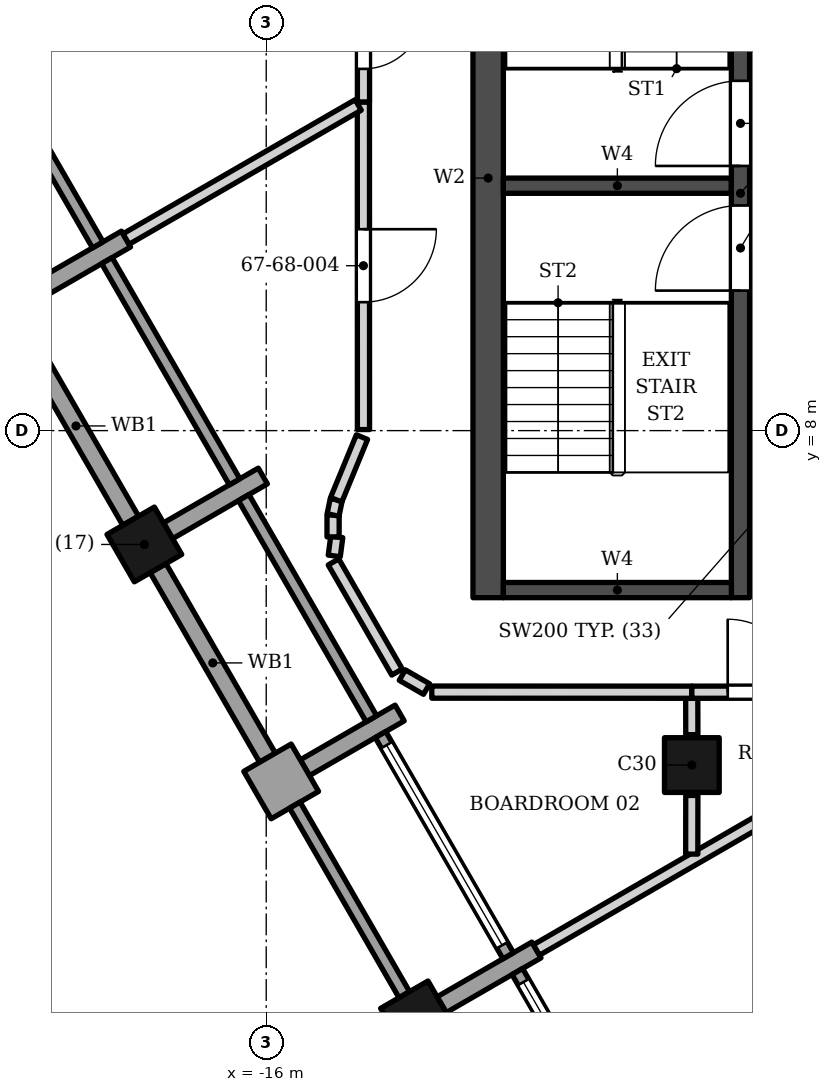
"""IFC4 building model, lengths in metres.
Left out: names, types, materials, properties, quantities, classifications, styles, units other than length and angle.
Written with IfcOpenShell. Run it as: python <this file> out.ifc"""

import sys

from ifc_helpers import new_model, si_unit, direction, frame, frame_2d, origin, origin_2d, place, context, subcontext, project, spatial, rectangle, extrude, element, fill, save


model = new_model("IFC4")
c1 = context("Model", 3, precision=1e-05, world=origin(), true_north=direction((0.0, 1.0)))
c2 = subcontext(c1, "Body", "Model", "MODEL_VIEW")
j1 = project(units=[si_unit("LENGTHUNIT", "METRE"), si_unit("PLANEANGLEUNIT", "RADIAN")], contexts=[c1])
p1 = place(None, origin())
s1 = spatial("IfcSite", under=j1, at=p1, CompositionType="ELEMENT")
p2 = place(p1, origin())
s2 = spatial("IfcBuilding", under=s1, at=p2, CompositionType="ELEMENT")
p3 = place(p2, frame((0.0, 0.0, 279.4)))
s3 = spatial("IfcBuildingStorey", under=s2, at=p3, CompositionType="ELEMENT", Elevation=279.4)
p4 = place(p3, frame((-12.35, 5.253, 0.0), z_axis=(0.0, 0.0, 1.0), x_axis=(0.0, 1.0, 0.0)))
e1 = element("IfcWall", 1, at=p4, inside=s3, PredefinedType="SHEAR", context=c2, shape_type="SweptSolid", body=[
    extrude(rectangle(XDim=13.8, YDim=0.5, at=frame_2d((6.9, 0.0))), origin(), (0.0, 0.0, 1.0), 3.9),
])
p5 = place(p3, frame((-8.2, 5.253, 0.0), z_axis=(0.0, 0.0, 1.0), x_axis=(0.0, 1.0, 0.0)))
e2 = element("IfcWall", 2, at=p5, inside=s3, PredefinedType="SHEAR", context=c2, shape_type="SweptSolid", body=[
    extrude(rectangle(XDim=13.3, YDim=0.3, at=frame_2d((6.65, 0.0))), origin(), (0.0, 0.0, 1.0), 3.9),
])
p6 = place(p5, frame((7.1, 0.0, 0.0)))
e3 = element("IfcOpeningElement", 3, at=p6, cuts=e2, PredefinedType="OPENING", context=c2, shape_type="SweptSolid", body=[
    extrude(rectangle(XDim=1.4, YDim=2.1, at=frame_2d((0.7, 1.05))), frame((0.0, 0.16, 0.0), z_axis=(0.0, -1.0, 0.0), x_axis=(1.0, 0.0, 0.0)), (0.0, 0.0, 1.0), 0.32),
])
p7 = place(p5, frame((5.05, 0.0, 0.0)))
e4 = element("IfcOpeningElement", 4, at=p7, cuts=e2, PredefinedType="OPENING", context=c2, shape_type="SweptSolid", body=[
    extrude(rectangle(XDim=1.4, YDim=2.1, at=frame_2d((0.7, 1.05))), frame((0.0, 0.16, 0.0), z_axis=(0.0, -1.0, 0.0), x_axis=(1.0, 0.0, 0.0)), (0.0, 0.0, 1.0), 0.32),
])
for number, where, z_axis, x_axis in (
    (5, (-12.1, 12.028, 0.0), (0.0, 0.0, 1.0), (1.0, 0.0, 0.0)),
    (6, (-12.1, 5.378, 0.0), (0.0, 0.0, 1.0), (1.0, 0.0, 0.0)),
):
    element("IfcWall", number, at=place(p3, frame(where, z_axis=z_axis, x_axis=x_axis)), inside=s3, PredefinedType="SHEAR", context=c2, shape_type="SweptSolid", body=[
        extrude(rectangle(XDim=3.75, YDim=0.25, at=frame_2d((1.875, 0.0))), origin(), (0.0, 0.0, 1.0), 3.9),
    ])
p8 = place(p3, frame((-8.05, 6.103, 0.0), z_axis=(0.0, 0.0, 1.0), x_axis=(1.0, 0.0, 0.0)))
e7 = element("IfcWall", 7, at=p8, inside=s3, PredefinedType="SHEAR", context=c2, shape_type="SweptSolid", body=[
    extrude(rectangle(XDim=7.05, YDim=0.5, at=frame_2d((3.525, 0.0))), origin(), (0.0, 0.0, 1.0), 3.9),
])
p9 = place(p8, frame((0.825, 0.0, 0.0)))
e8 = element("IfcOpeningElement", 8, at=p9, cuts=e7, PredefinedType="OPENING", context=c2, shape_type="SweptSolid", body=[
    extrude(rectangle(XDim=0.9, YDim=2.1, at=frame_2d((0.45, 1.05))), frame((0.0, 0.26, 0.0), z_axis=(0.0, -1.0, 0.0), x_axis=(1.0, 0.0, 0.0)), (0.0, 0.0, 1.0), 0.52),
])
for number, where, z_axis, x_axis in (
    (9, (-9.0, 2.5, 0.0), (0.0, 0.0, 1.0), (1.0, 0.0, 0.0)),
    (10, (-18.004, 6.128, 0.0), (0.0, 0.0, 1.0), (0.5, -0.866, 0.0)),
    (11, (-13.504, -1.666, 0.0), (0.0, 0.0, 1.0), (0.5, -0.866, 0.0)),
):
    element("IfcColumn", number, at=place(p3, frame(where, z_axis=z_axis, x_axis=x_axis)), inside=s3, PredefinedType="COLUMN", context=c2, shape_type="SweptSolid", body=[
        extrude(rectangle(XDim=0.9, YDim=0.9, at=origin_2d()), origin(), (0.0, 0.0, 1.0), 3.9),
    ])
p10 = place(p3, frame((-19.864, 10.25, 0.0), z_axis=(0.0, 0.0, 1.0), x_axis=(0.866047807691, 0.499961193289, 0.0)))
e12 = element("IfcWall", 12, at=p10, inside=s3, PredefinedType="SOLIDWALL", context=c2, shape_type="SweptSolid", body=[
    extrude(rectangle(XDim=1.8, YDim=0.3, at=frame_2d((0.9, 0.0))), origin(), (0.0, 0.0, 1.0), 3.0),
])
p11 = place(p3, frame((-17.614, 6.353, 0.0), z_axis=(0.0, 0.0, 1.0), x_axis=(0.866047807691, 0.499961193289, 0.0)))
e13 = element("IfcWall", 13, at=p11, inside=s3, PredefinedType="SOLIDWALL", context=c2, shape_type="SweptSolid", body=[
    extrude(rectangle(XDim=1.8, YDim=0.3, at=frame_2d((0.9, 0.0))), origin(), (0.0, 0.0, 1.0), 2.95),
])
p12 = place(p3, frame((-15.979, 2.621, 0.0), z_axis=(0.0, 0.0, 1.0), x_axis=(0.50001992892, -0.866013897511, 0.0)))
e14 = element("IfcWall", 14, at=p12, inside=s3, PredefinedType="SOLIDWALL", context=c2, shape_type="SweptSolid", body=[
    extrude(rectangle(XDim=0.9, YDim=0.9, at=frame_2d((0.45, 0.0))), origin(), (0.0, 0.0, 1.0), 3.0),
])
for number, where, z_axis, x_axis in (
    (15, (-13.805, 3.356, 0.0), (0.0, 0.0, 1.0), (-0.866, -0.5, 0.0)),
    (16, (-11.555, -0.541, 0.0), (0.0, 0.0, 1.0), (-0.866, -0.5, 0.0)),
):
    element("IfcWall", number, at=place(p3, frame(where, z_axis=z_axis, x_axis=x_axis)), inside=s3, PredefinedType="SOLIDWALL", context=c2, shape_type="SweptSolid", body=[
        extrude(rectangle(XDim=1.8, YDim=0.3, at=frame_2d((0.9, 0.0))), origin(), (0.0, 0.0, 1.0), 3.0),
    ])
p13 = place(p3, frame((-20.87, 14.693, 0.0), z_axis=(0.0, 0.0, 1.0), x_axis=(0.499958946799, -0.866049104564, 0.0)))
e17 = element("IfcWall", 17, at=p13, inside=s3, PredefinedType="ELEMENTEDWALL", context=c2, shape_type="SweptSolid", body=[
    extrude(rectangle(XDim=4.2, YDim=0.2, at=frame_2d((2.1, 0.0))), origin(), (0.0, 0.0, 1.0), 3.0),
])
p14 = place(p3, frame((-20.029, 9.636, 0.0), z_axis=(0.0, 0.0, 1.0), x_axis=(0.500012057535, -0.866018442252, 0.0)))
e18 = element("IfcWall", 18, at=p14, inside=s3, PredefinedType="SOLIDWALL", context=c2, shape_type="SweptSolid", body=[
    extrude(rectangle(XDim=3.6, YDim=0.3, at=frame_2d((1.8, 0.0))), origin(), (0.0, 0.0, 1.0), 3.0),
])
p15 = place(p3, frame((-18.62, 10.795, 0.0), z_axis=(0.0, 0.0, 1.0), x_axis=(0.49998411664, -0.866034573852, 0.0)))
e19 = element("IfcWall", 19, at=p15, inside=s3, PredefinedType="ELEMENTEDWALL", context=c2, shape_type="SweptSolid", body=[
    extrude(rectangle(XDim=4.2, YDim=0.2, at=frame_2d((2.1, 0.0))), origin(), (0.0, 0.0, 1.0), 3.0),
])
p16 = place(p3, frame((-17.779, 5.739, 0.0), z_axis=(0.0, 0.0, 1.0), x_axis=(0.500012057535, -0.866018442252, 0.0)))
e20 = element("IfcWall", 20, at=p16, inside=s3, PredefinedType="SOLIDWALL", context=c2, shape_type="SweptSolid", body=[
    extrude(rectangle(XDim=3.6, YDim=0.3, at=frame_2d((1.8, 0.0))), origin(), (0.0, 0.0, 1.0), 3.0),
])
p17 = place(p3, frame((-16.37, 6.898, 0.0), z_axis=(0.0, 0.0, 1.0), x_axis=(0.499958946799, -0.866049104564, 0.0)))
e21 = element("IfcWall", 21, at=p17, inside=s3, PredefinedType="ELEMENTEDWALL", context=c2, shape_type="SweptSolid", body=[
    extrude(rectangle(XDim=4.2, YDim=0.2, at=frame_2d((2.1, 0.0))), origin(), (0.0, 0.0, 1.0), 2.95),
])
p18 = place(p3, frame((-15.529, 1.842, 0.0), z_axis=(0.0, 0.0, 1.0), x_axis=(0.500012057535, -0.866018442252, 0.0)))
e22 = element("IfcWall", 22, at=p18, inside=s3, PredefinedType="SOLIDWALL", context=c2, shape_type="SweptSolid", body=[
    extrude(rectangle(XDim=3.6, YDim=0.2, at=frame_2d((1.8, 0.0))), origin(), (0.0, 0.0, 1.0), 3.0),
])
p19 = place(p3, frame((-14.12, 3.001, 0.0), z_axis=(0.0, 0.0, 1.0), x_axis=(0.49998411664, -0.866034573852, 0.0)))
e23 = element("IfcWall", 23, at=p19, inside=s3, PredefinedType="ELEMENTEDWALL", context=c2, shape_type="SweptSolid", body=[
    extrude(rectangle(XDim=4.2, YDim=0.2, at=frame_2d((2.1, 0.0))), origin(), (0.0, 0.0, 1.0), 3.0),
])
p20 = place(p19, frame((0.2, 0.0, 0.45)))
e24 = element("IfcOpeningElement", 24, at=p20, cuts=e23, PredefinedType="OPENING", context=c2, shape_type="SweptSolid", body=[
    extrude(rectangle(XDim=3.8, YDim=2.25, at=frame_2d((1.9, 1.125))), frame((0.0, 0.11, 0.0), z_axis=(0.0, -1.0, 0.0), x_axis=(1.0, 0.0, 0.0)), (0.0, 0.0, 1.0), 0.22),
])
p21 = place(p3, frame((-11.87, -0.896, 0.0), z_axis=(0.0, 0.0, 1.0), x_axis=(0.499958946799, -0.866049104564, 0.0)))
e25 = element("IfcWall", 25, at=p21, inside=s3, PredefinedType="ELEMENTEDWALL", context=c2, shape_type="SweptSolid", body=[
    extrude(rectangle(XDim=4.2, YDim=0.2, at=frame_2d((2.1, 0.0))), origin(), (0.0, 0.0, 1.0), 3.0),
])
p22 = place(p21, frame((0.2, 0.0, 0.45)))
e26 = element("IfcOpeningElement", 26, at=p22, cuts=e25, PredefinedType="OPENING", context=c2, shape_type="SweptSolid", body=[
    extrude(rectangle(XDim=2.4, YDim=2.25, at=frame_2d((1.2, 1.125))), frame((0.0, 0.11, 0.0), z_axis=(0.0, -1.0, 0.0), x_axis=(1.0, 0.0, 0.0)), (0.0, 0.0, 1.0), 0.22),
])
p23 = place(p21, frame((2.8, 0.0, 0.0)))
e27 = element("IfcOpeningElement", 27, at=p23, cuts=e25, PredefinedType="OPENING", context=c2, shape_type="SweptSolid", body=[
    extrude(rectangle(XDim=1.2, YDim=2.7, at=frame_2d((0.6, 1.35))), frame((0.0, 0.11, 0.0), z_axis=(0.0, -1.0, 0.0), x_axis=(1.0, 0.0, 0.0)), (0.0, 0.0, 1.0), 0.22),
])
p24 = place(p3, frame((-8.05, 7.853, 0.0), z_axis=(0.0, 0.0, 1.0), x_axis=(1.0, 0.0, 0.0)))
e28 = element("IfcWall", 28, at=p24, inside=s3, PredefinedType="SOLIDWALL", context=c2, shape_type="SweptSolid", body=[
    extrude(rectangle(XDim=2.5, YDim=0.2, at=frame_2d((1.25, 0.0))), origin(), (0.0, 0.0, 1.0), 3.73),
])
p25 = place(p3, frame((-11.556, -0.541, 0.0), z_axis=(0.0, 0.0, 1.0), x_axis=(0.865781982927, 0.500421380478, 0.0)))
e29 = element("IfcWall", 29, at=p25, inside=s3, PredefinedType="PARTITIONING", context=c2, shape_type="SweptSolid", body=[
    extrude(rectangle(XDim=6.45, YDim=0.2, at=frame_2d((3.225, 0.0))), origin(), (0.0, 0.0, 1.0), 3.202),
])
p26 = place(p3, frame((-9.002, 1.036, 0.0), z_axis=(0.0, 0.0, 1.0), x_axis=(0.001518985589, 0.999998846341, 0.0)))
e30 = element("IfcWall", 30, at=p26, inside=s3, PredefinedType="PARTITIONING", context=c2, shape_type="SweptSolid", body=[
    extrude(rectangle(XDim=0.964, YDim=0.2, at=frame_2d((0.482, 0.0))), origin(), (0.0, 0.0, 1.0), 3.202),
])
p27 = place(p3, frame((-9.002, 3.6, 0.0), z_axis=(0.0, 0.0, 1.0), x_axis=(0.002442989453, -0.999997015897, 0.0)))
e31 = element("IfcWall", 31, at=p27, inside=s3, PredefinedType="PARTITIONING", context=c2, shape_type="SweptSolid", body=[
    extrude(rectangle(XDim=0.6, YDim=0.2, at=frame_2d((0.3, 0.0))), origin(), (0.0, 0.0, 1.0), 3.332),
])
p28 = place(p3, frame((-13.277, 3.7, 0.0), z_axis=(0.0, 0.0, 1.0), x_axis=(0.999999920155, -0.000399611774, 0.0)))
e32 = element("IfcWall", 32, at=p28, inside=s3, PredefinedType="PARTITIONING", context=c2, shape_type="SweptSolid", body=[
    extrude(rectangle(XDim=4.277, YDim=0.2, at=frame_2d((2.138, 0.0))), origin(), (0.0, 0.0, 1.0), 3.73),
])
p29 = place(p3, frame((-9.0, 3.698, 0.0), z_axis=(0.0, 0.0, 1.0), x_axis=(0.999999810961, 0.000614879982, 0.0)))
e33 = element("IfcWall", 33, at=p29, inside=s3, PredefinedType="PARTITIONING", context=c2, shape_type="SweptSolid", body=[
    extrude(rectangle(XDim=2.382, YDim=0.2, at=frame_2d((1.191, 0.0))), origin(), (0.0, 0.0, 1.0), 3.73),
])
p30 = place(p29, frame((0.59, 0.0, 0.0)))
e34 = element("IfcOpeningElement", 34, at=p30, cuts=e33, PredefinedType="OPENING", context=c2, shape_type="SweptSolid", body=[
    extrude(rectangle(XDim=1.2, YDim=2.4, at=frame_2d((0.6, 1.2))), frame((0.0, 0.11, 0.0), z_axis=(0.0, -1.0, 0.0), x_axis=(1.0, 0.0, 0.0)), (0.0, 0.0, 1.0), 0.22),
])
p31 = place(p3, frame((-13.762, 3.98, 0.0), z_axis=(0.0, 0.0, 1.0), x_axis=(0.865982457891, -0.500074377092, 0.0)))
e35 = element("IfcWall", 35, at=p31, inside=s3, PredefinedType="PARTITIONING", context=c2, shape_type="SweptSolid", body=[
    extrude(rectangle(XDim=0.46, YDim=0.2, at=frame_2d((0.23, 0.0))), origin(), (0.0, 0.0, 1.0), 3.332),
])
p32 = place(p3, frame((-14.894, 5.84, 0.0), z_axis=(0.0, 0.0, 1.0), x_axis=(0.500120010312, -0.86595610471, 0.0)))
e36 = element("IfcWall", 36, at=p32, inside=s3, PredefinedType="PARTITIONING", context=c2, shape_type="SweptSolid", body=[
    extrude(rectangle(XDim=2.091, YDim=0.2, at=frame_2d((1.045, 0.0))), origin(), (0.0, 0.0, 1.0), 3.73),
])
p33 = place(p3, frame((-14.881, 5.94, 0.0), z_axis=(0.0, 0.0, 1.0), x_axis=(0.130133906157, 0.991496427865, 0.0)))
e37 = element("IfcWall", 37, at=p33, inside=s3, PredefinedType="PARTITIONING", context=c2, shape_type="SweptSolid", body=[
    extrude(rectangle(XDim=0.315, YDim=0.2, at=frame_2d((0.158, 0.0))), origin(), (0.0, 0.0, 1.0), 2.95),
])
p34 = place(p3, frame((-14.9, 6.252, 0.0), z_axis=(0.0, 0.0, 1.0), x_axis=(0.0, 1.0, 0.0)))
e38 = element("IfcWall", 38, at=p34, inside=s3, PredefinedType="PARTITIONING", context=c2, shape_type="SweptSolid", body=[
    extrude(rectangle(XDim=0.36, YDim=0.2, at=frame_2d((0.18, 0.0))), origin(), (0.0, 0.0, 1.0), 2.95),
])
p35 = place(p3, frame((-14.9, 6.613, 0.0), z_axis=(0.0, 0.0, 1.0), x_axis=(0.200521214098, 0.979689360306, 0.0)))
e39 = element("IfcWall", 39, at=p35, inside=s3, PredefinedType="PARTITIONING", context=c2, shape_type="SweptSolid", body=[
    extrude(rectangle(XDim=0.256, YDim=0.2, at=frame_2d((0.128, 0.0))), origin(), (0.0, 0.0, 1.0), 3.73),
])
p36 = place(p3, frame((-14.849, 6.863, 0.0), z_axis=(0.0, 0.0, 1.0), x_axis=(0.380782882389, 0.924664477786, 0.0)))
e40 = element("IfcWall", 40, at=p36, inside=s3, PredefinedType="PARTITIONING", context=c2, shape_type="SweptSolid", body=[
    extrude(rectangle(XDim=1.114, YDim=0.2, at=frame_2d((0.557, 0.0))), origin(), (0.0, 0.0, 1.0), 3.73),
])
p37 = place(p3, frame((-14.402, 13.404, 0.0), z_axis=(0.0, 0.0, 1.0), x_axis=(0.000317258867, -0.999999949673, 0.0)))
e41 = element("IfcWall", 41, at=p37, inside=s3, PredefinedType="PARTITIONING", context=c2, shape_type="SweptSolid", body=[
    extrude(rectangle(XDim=5.387, YDim=0.2, at=frame_2d((2.693, 0.0))), origin(), (0.0, 0.0, 1.0), 3.73),
])
p38 = place(p37, frame((2.092, 0.0, 0.0)))
e42 = element("IfcOpeningElement", 42, at=p38, cuts=e41, PredefinedType="OPENING", context=c2, shape_type="SweptSolid", body=[
    extrude(rectangle(XDim=1.2, YDim=2.4, at=frame_2d((0.6, 1.2))), frame((0.0, 0.11, 0.0), z_axis=(0.0, -1.0, 0.0), x_axis=(1.0, 0.0, 0.0)), (0.0, 0.0, 1.0), 0.22),
])
p39 = place(p3, frame((-18.306, 11.151, 0.0), z_axis=(0.0, 0.0, 1.0), x_axis=(0.866033448958, 0.499986065091, 0.0)))
e43 = element("IfcWall", 43, at=p39, inside=s3, PredefinedType="PARTITIONING", context=c2, shape_type="SweptSolid", body=[
    extrude(rectangle(XDim=4.409, YDim=0.2, at=frame_2d((2.205, 0.0))), origin(), (0.0, 0.0, 1.0), 3.128),
])
p40 = place(p3, frame((-14.4, 13.405, 0.0), z_axis=(0.0, 0.0, 1.0), x_axis=(0.0, 1.0, 0.0)))
e44 = element("IfcWall", 44, at=p40, inside=s3, PredefinedType="PARTITIONING", context=c2, shape_type="SweptSolid", body=[
    extrude(rectangle(XDim=1.888, YDim=0.2, at=frame_2d((0.944, 0.0))), origin(), (0.0, 0.0, 1.0), 3.73),
])
p41 = place(p40, frame((0.544, 0.0, 0.0)))
e45 = element("IfcOpeningElement", 45, at=p41, cuts=e44, PredefinedType="OPENING", context=c2, shape_type="SweptSolid", body=[
    extrude(rectangle(XDim=1.0, YDim=2.4, at=frame_2d((0.5, 1.2))), frame((0.0, 0.11, 0.0), z_axis=(0.0, -1.0, 0.0), x_axis=(1.0, 0.0, 0.0)), (0.0, 0.0, 1.0), 0.22),
])
p42 = place(p20, origin())
e46 = element("IfcWindow", 46, at=p42, inside=s3, PartitioningType="SINGLE_PANEL", PredefinedType="WINDOW", context=c2, shape_type="SweptSolid", body=[
    extrude(rectangle(XDim=3.8, YDim=2.25, at=frame_2d((1.9, 1.125))), frame((0.0, 0.03, 0.0), z_axis=(0.0, -1.0, 0.0), x_axis=(1.0, 0.0, 0.0)), (0.0, 0.0, 1.0), 0.06),
])
fill(e24, e46)
p43 = place(p22, origin())
e47 = element("IfcWindow", 47, at=p43, inside=s3, PartitioningType="SINGLE_PANEL", PredefinedType="WINDOW", context=c2, shape_type="SweptSolid", body=[
    extrude(rectangle(XDim=2.4, YDim=2.25, at=frame_2d((1.2, 1.125))), frame((0.0, 0.03, 0.0), z_axis=(0.0, -1.0, 0.0), x_axis=(1.0, 0.0, 0.0)), (0.0, 0.0, 1.0), 0.06),
])
fill(e26, e47)
p44 = place(p6, origin())
e48 = element("IfcDoor", 48, at=p44, inside=s3, OperationType="SINGLE_SWING_LEFT", PredefinedType="DOOR", context=c2, shape_type="SweptSolid", body=[
    extrude(rectangle(XDim=1.4, YDim=2.1, at=frame_2d((0.7, 1.05))), frame((0.0, 0.025, 0.0), z_axis=(0.0, -1.0, 0.0), x_axis=(1.0, 0.0, 0.0)), (0.0, 0.0, 1.0), 0.05),
])
fill(e3, e48)
p45 = place(p7, origin())
e49 = element("IfcDoor", 49, at=p45, inside=s3, OperationType="SINGLE_SWING_LEFT", PredefinedType="DOOR", context=c2, shape_type="SweptSolid", body=[
    extrude(rectangle(XDim=1.4, YDim=2.1, at=frame_2d((0.7, 1.05))), frame((0.0, 0.025, 0.0), z_axis=(0.0, -1.0, 0.0), x_axis=(1.0, 0.0, 0.0)), (0.0, 0.0, 1.0), 0.05),
])
fill(e4, e49)
p46 = place(p30, origin())
e50 = element("IfcDoor", 50, at=p46, inside=s3, OperationType="SINGLE_SWING_LEFT", PredefinedType="DOOR", context=c2, shape_type="SweptSolid", body=[
    extrude(rectangle(XDim=1.2, YDim=2.4, at=frame_2d((0.6, 1.2))), frame((0.0, 0.025, 0.0), z_axis=(0.0, -1.0, 0.0), x_axis=(1.0, 0.0, 0.0)), (0.0, 0.0, 1.0), 0.05),
])
fill(e34, e50)
p47 = place(p38, origin())
e51 = element("IfcDoor", 51, at=p47, inside=s3, OperationType="SINGLE_SWING_LEFT", PredefinedType="DOOR", context=c2, shape_type="SweptSolid", body=[
    extrude(rectangle(XDim=1.2, YDim=2.4, at=frame_2d((0.6, 1.2))), frame((0.0, 0.025, 0.0), z_axis=(0.0, -1.0, 0.0), x_axis=(1.0, 0.0, 0.0)), (0.0, 0.0, 1.0), 0.05),
])
fill(e42, e51)
p48 = place(p41, origin())
e52 = element("IfcDoor", 52, at=p48, inside=s3, OperationType="SINGLE_SWING_RIGHT", PredefinedType="DOOR", context=c2, shape_type="SweptSolid", body=[
    extrude(rectangle(XDim=1.0, YDim=2.4, at=frame_2d((0.5, 1.2))), frame((0.0, 0.025, 0.0), z_axis=(0.0, -1.0, 0.0), x_axis=(1.0, 0.0, 0.0)), (0.0, 0.0, 1.0), 0.05),
])
fill(e45, e52)
save(model, sys.argv[1])
